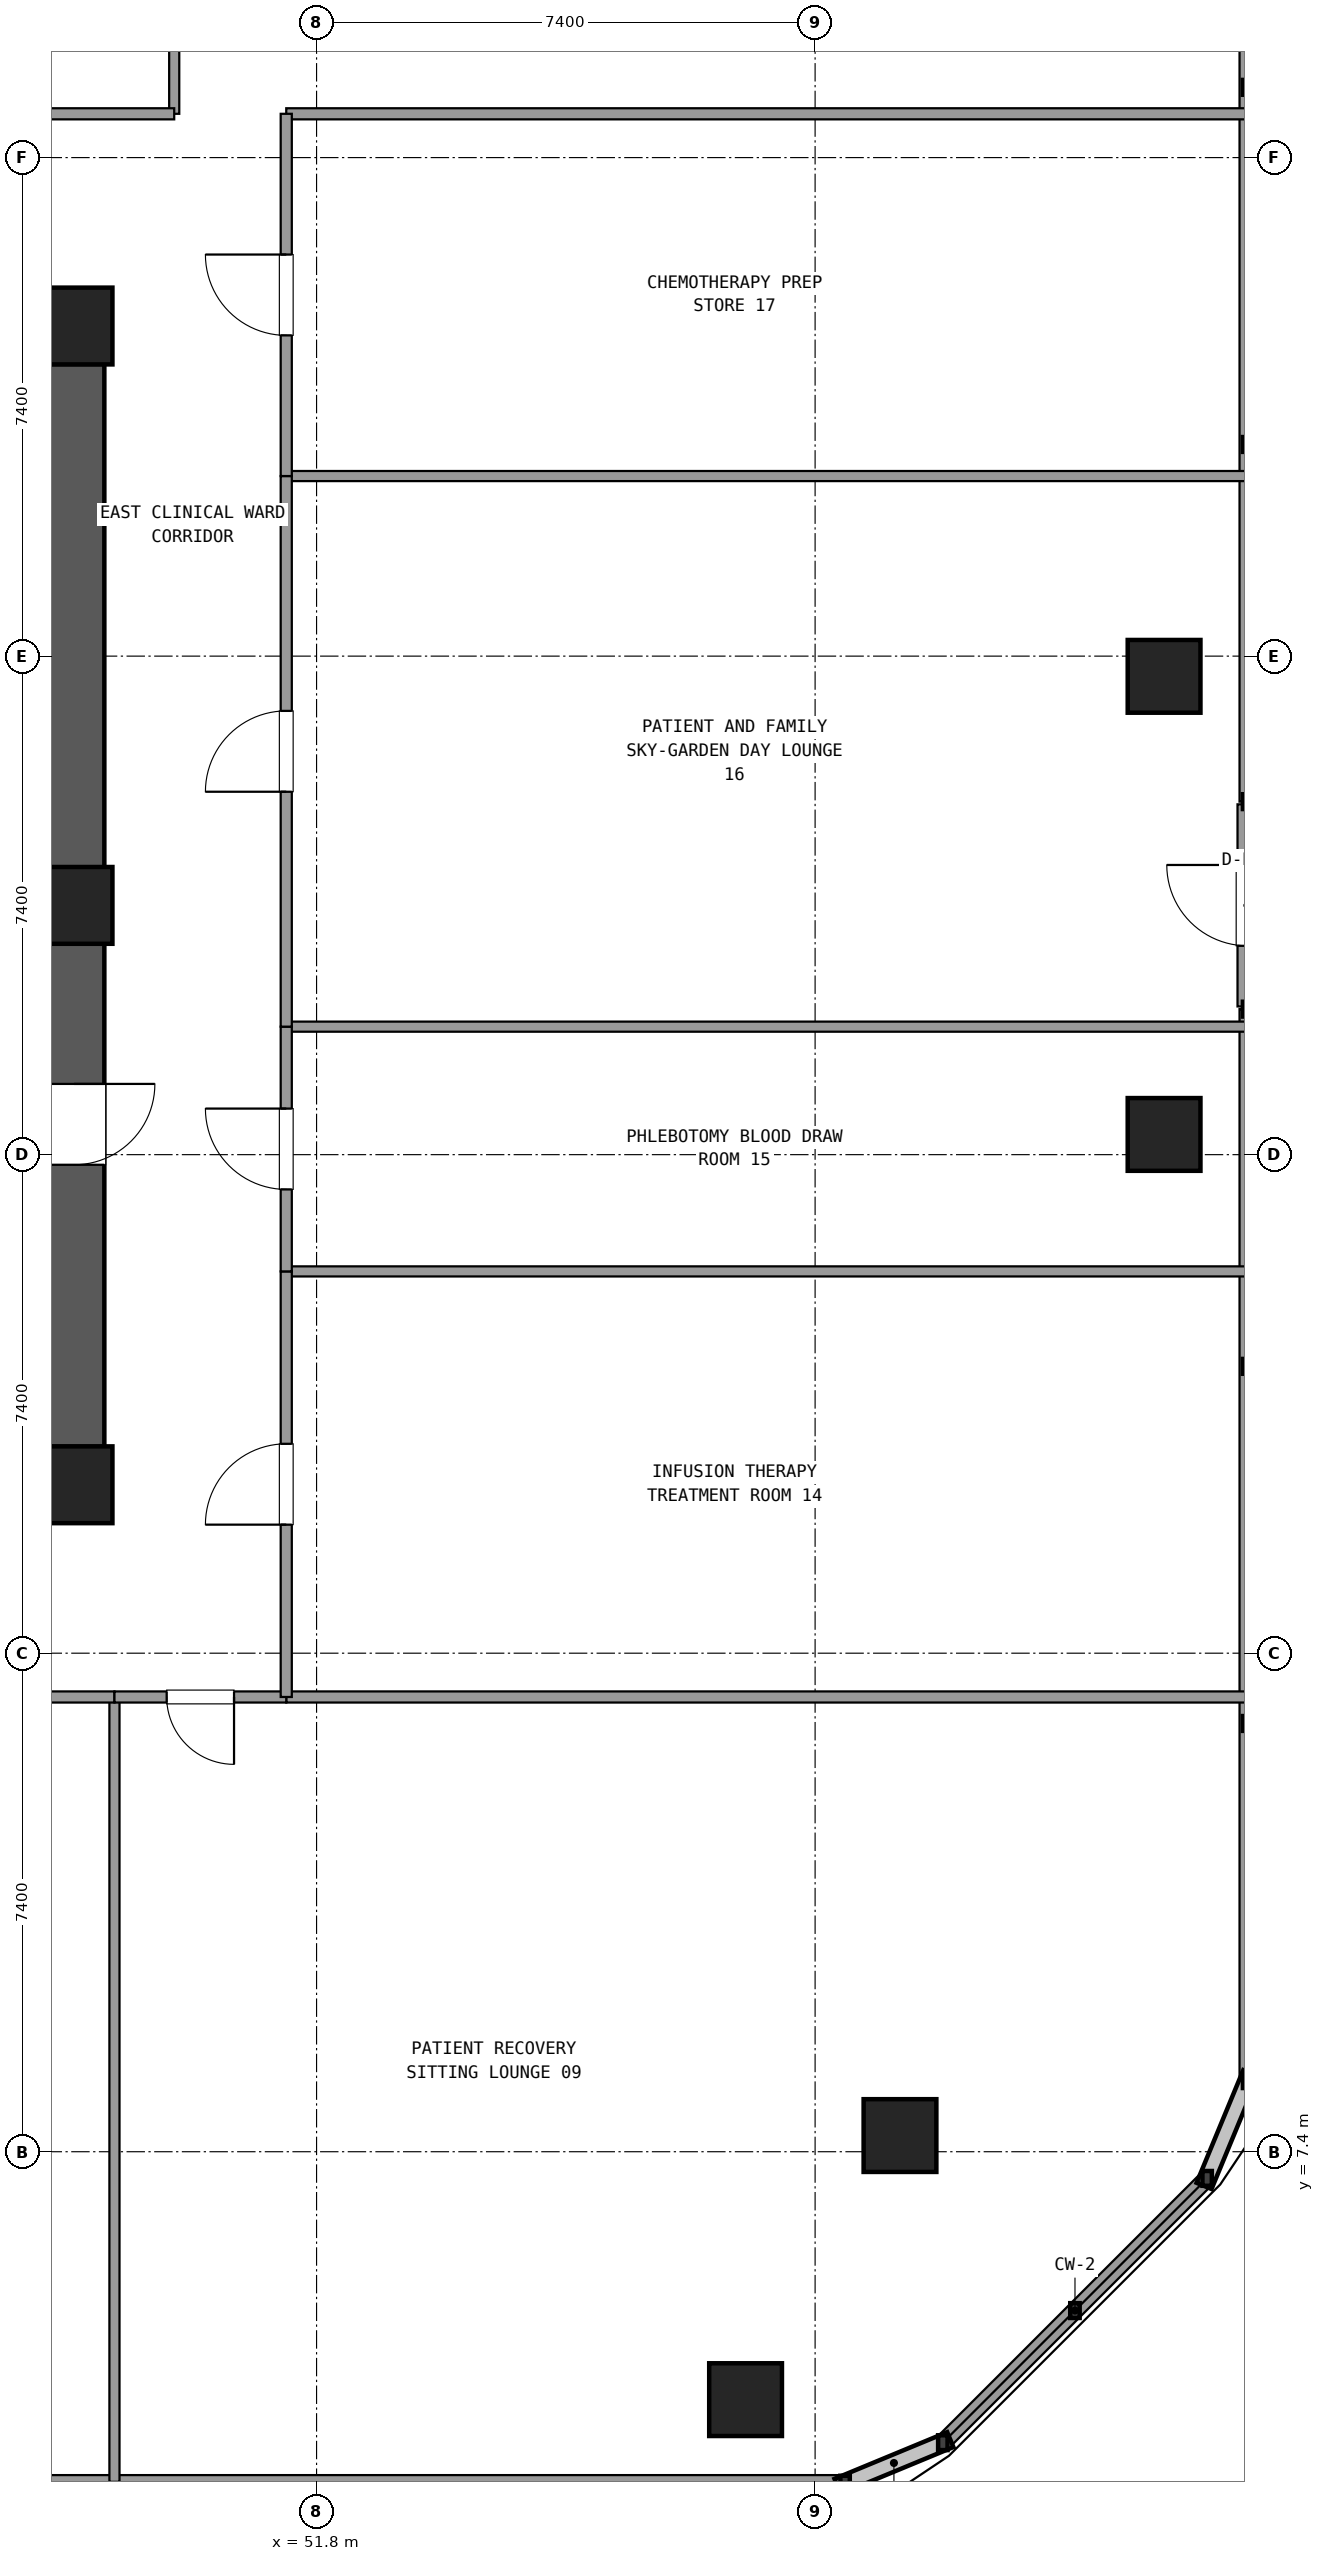
"""IFC4 building model, lengths in metres.
Left out: names, types, materials, properties, quantities, classifications, styles, units other than length and angle.
Written with IfcOpenShell. Run it as: python <this file> out.ifc"""

import sys

from ifc_helpers import new_model, si_unit, direction, frame, frame_2d, origin, origin_2d, place, context, subcontext, project, spatial, rectangle, extrude, element, fill, save


model = new_model("IFC4")
c1 = context("Model", 3, precision=1e-05, world=origin(), true_north=direction((0.0, 1.0)))
c2 = subcontext(c1, "Body", "Model", "MODEL_VIEW")
j1 = project(units=[si_unit("LENGTHUNIT", "METRE"), si_unit("PLANEANGLEUNIT", "RADIAN")], contexts=[c1])
p1 = place(None, origin())
s1 = spatial("IfcSite", under=j1, at=p1, CompositionType="ELEMENT")
p2 = place(p1, origin())
s2 = spatial("IfcBuilding", under=s1, at=p2, CompositionType="ELEMENT")
p3 = place(p2, frame((0.0, 0.0, 59.94)))
s3 = spatial("IfcBuildingStorey", under=s2, at=p3, CompositionType="ELEMENT", Elevation=59.94)
for number, where, z_axis, x_axis in (
    (1, (48.2, 17.3, 0.0), (0.0, 0.0, 1.0), (1.0, 0.0, 0.0)),
    (2, (48.2, 25.9, 0.0), (0.0, 0.0, 1.0), (1.0, 0.0, 0.0)),
    (3, (48.2, 34.5, 0.0), (0.0, 0.0, 1.0), (1.0, 0.0, 0.0)),
):
    element("IfcColumn", number, at=place(p3, frame(where, z_axis=z_axis, x_axis=x_axis)), inside=s3, PredefinedType="COLUMN", context=c2, shape_type="SweptSolid", body=[
        extrude(rectangle(XDim=1.14, YDim=1.14, at=origin_2d()), origin(), (0.0, 0.0, 1.0), 3.6),
    ])
p4 = place(p3, frame((48.2, 17.865, 0.0), z_axis=(0.0, 0.0, 1.0), x_axis=(0.0, 1.0, 0.0)))
e4 = element("IfcWall", 4, at=p4, inside=s3, PredefinedType="SHEAR", context=c2, shape_type="SweptSolid", body=[
    extrude(rectangle(XDim=7.47, YDim=0.9, at=frame_2d((3.735, 0.0))), origin(), (0.0, 0.0, 1.0), 3.32),
])
p5 = place(p4, frame((4.185, 0.0, 0.0)))
e5 = element("IfcOpeningElement", 5, at=p5, cuts=e4, PredefinedType="OPENING", context=c2, shape_type="SweptSolid", body=[
    extrude(rectangle(XDim=1.2, YDim=2.15, at=frame_2d((0.6, 1.075))), frame((0.0, 0.46, 0.0), z_axis=(0.0, -1.0, 0.0), x_axis=(1.0, 0.0, 0.0)), (0.0, 0.0, 1.0), 0.92),
])
p6 = place(p3, frame((48.2, 26.465, 0.0), z_axis=(0.0, 0.0, 1.0), x_axis=(0.0, 1.0, 0.0)))
e6 = element("IfcWall", 6, at=p6, inside=s3, PredefinedType="SHEAR", context=c2, shape_type="SweptSolid", body=[
    extrude(rectangle(XDim=7.47, YDim=0.9, at=frame_2d((3.735, 0.0))), origin(), (0.0, 0.0, 1.0), 3.32),
])
for number, where, z_axis, x_axis in (
    (7, (58.168, 3.72, 0.0), (0.0, 0.0, 1.0), (1.0, 0.0, 0.0)),
    (8, (60.46, 7.64, 0.0), (0.0, 0.0, 1.0), (1.0, 0.0, 0.0)),
    (9, (64.38, 22.5, 0.0), (0.0, 0.0, 1.0), (1.0, 0.0, 0.0)),
    (10, (64.38, 29.3, 0.0), (0.0, 0.0, 1.0), (1.0, 0.0, 0.0)),
):
    element("IfcColumn", number, at=place(p3, frame(where, z_axis=z_axis, x_axis=x_axis)), inside=s3, PredefinedType="COLUMN", context=c2, shape_type="SweptSolid", body=[
        extrude(rectangle(XDim=1.08, YDim=1.08, at=origin_2d()), origin(), (0.0, 0.0, 1.0), 3.6),
    ])
p7 = place(p3, frame((14.355, 2.48, 0.0), z_axis=(0.0, 0.0, 1.0), x_axis=(1.0, 0.0, 0.0)))
e11 = element("IfcWall", 11, at=p7, inside=s3, PredefinedType="SOLIDWALL", context=c2, shape_type="SweptSolid", body=[
    extrude(rectangle(XDim=45.29, YDim=0.24, at=frame_2d((22.645, 0.0))), origin(), (0.0, 0.0, 1.0), 0.85),
])
p8 = place(p3, frame((61.096, 3.081, 0.0), z_axis=(0.0, 0.0, 1.0), x_axis=(0.707128783731, 0.707084777957, 0.0)))
e12 = element("IfcWall", 12, at=p8, inside=s3, PredefinedType="SOLIDWALL", context=c2, shape_type="SweptSolid", body=[
    extrude(rectangle(XDim=5.548, YDim=0.24, at=frame_2d((2.774, 0.0))), origin(), (0.0, 0.0, 1.0), 0.85),
])
p9 = place(p3, frame((65.62, 24.4, 0.0), z_axis=(0.0, 0.0, 1.0), x_axis=(0.0, 1.0, 0.0)))
e13 = element("IfcWall", 13, at=p9, inside=s3, PredefinedType="SOLIDWALL", context=c2, shape_type="SweptSolid", body=[
    extrude(rectangle(XDim=3.0, YDim=0.3, at=frame_2d((1.5, 0.0))), origin(), (0.0, 0.0, 1.0), 2.65),
])
p10 = place(p9, frame((0.9, 0.0, 0.0)))
e14 = element("IfcOpeningElement", 14, at=p10, cuts=e13, PredefinedType="OPENING", context=c2, shape_type="SweptSolid", body=[
    extrude(rectangle(XDim=1.2, YDim=2.2, at=frame_2d((0.6, 1.1))), frame((0.0, 0.16, 0.0), z_axis=(0.0, -1.0, 0.0), x_axis=(1.0, 0.0, 0.0)), (0.0, 0.0, 1.0), 0.32),
])
for number, where, z_axis, x_axis in (
    (15, (65.62, 8.455, 0.0), (0.0, 0.0, 1.0), (0.0, 1.0, 0.0)),
    (16, (65.62, 27.44, 0.0), (0.0, 0.0, 1.0), (0.0, 1.0, 0.0)),
):
    element("IfcWall", number, at=place(p3, frame(where, z_axis=z_axis, x_axis=x_axis)), inside=s3, PredefinedType="SOLIDWALL", context=c2, shape_type="SweptSolid", body=[
        extrude(rectangle(XDim=15.905, YDim=0.24, at=frame_2d((7.953, 0.0))), origin(), (0.0, 0.0, 1.0), 0.85),
    ])
for number, where, z_axis, x_axis in (
    (17, (51.35, 37.65, 0.0), (0.0, 0.0, 1.0), (1.0, 0.0, 0.0)),
    (18, (51.35, 14.15, 0.0), (0.0, 0.0, 1.0), (1.0, 0.0, 0.0)),
):
    element("IfcWall", number, at=place(p3, frame(where, z_axis=z_axis, x_axis=x_axis)), inside=s3, PredefinedType="PARTITIONING", context=c2, shape_type="SweptSolid", body=[
        extrude(rectangle(XDim=14.25, YDim=0.165, at=frame_2d((7.125, 0.0))), origin(), (0.0, 0.0, 1.0), 2.61),
    ])
p11 = place(p3, frame((49.687, 37.65, 0.0), z_axis=(0.0, 0.0, 1.0), x_axis=(0.0, 1.0, 0.0)))
e19 = element("IfcWall", 19, at=p11, inside=s3, PredefinedType="PARTITIONING", context=c2, shape_type="SweptSolid", body=[
    extrude(rectangle(XDim=11.65, YDim=0.15, at=frame_2d((5.825, 0.0))), origin(), (0.0, 0.0, 1.0), 2.61),
])
p12 = place(p3, frame((40.31, 37.65, 0.0), z_axis=(0.0, 0.0, 1.0), x_axis=(1.0, 0.0, 0.0)))
e20 = element("IfcWall", 20, at=p12, inside=s3, PredefinedType="PARTITIONING", context=c2, shape_type="SweptSolid", body=[
    extrude(rectangle(XDim=9.377, YDim=0.165, at=frame_2d((4.688, 0.0))), origin(), (0.0, 0.0, 1.0), 2.61),
])
p13 = place(p12, frame((4.088, 0.0, 0.0)))
e21 = element("IfcOpeningElement", 21, at=p13, cuts=e20, PredefinedType="OPENING", context=c2, shape_type="SweptSolid", body=[
    extrude(rectangle(XDim=1.2, YDim=2.15, at=frame_2d((0.6, 1.075))), frame((0.0, 0.093, 0.0), z_axis=(0.0, -1.0, 0.0), x_axis=(1.0, 0.0, 0.0)), (0.0, 0.0, 1.0), 0.185),
])
p14 = place(p3, frame((48.8, 14.15, 0.0), z_axis=(0.0, 0.0, 1.0), x_axis=(0.0, -1.0, 0.0)))
e22 = element("IfcWall", 22, at=p14, inside=s3, PredefinedType="PARTITIONING", context=c2, shape_type="SweptSolid", body=[
    extrude(rectangle(XDim=11.65, YDim=0.15, at=frame_2d((5.825, 0.0))), origin(), (0.0, 0.0, 1.0), 2.61),
])
p15 = place(p3, frame((40.861, 14.15, 0.0), z_axis=(0.0, 0.0, 1.0), x_axis=(1.0, 0.0, 0.0)))
e23 = element("IfcWall", 23, at=p15, inside=s3, PredefinedType="PARTITIONING", context=c2, shape_type="SweptSolid", body=[
    extrude(rectangle(XDim=7.939, YDim=0.165, at=frame_2d((3.969, 0.0))), origin(), (0.0, 0.0, 1.0), 2.61),
])
p16 = place(p15, frame((3.369, 0.0, 0.0)))
e24 = element("IfcOpeningElement", 24, at=p16, cuts=e23, PredefinedType="OPENING", context=c2, shape_type="SweptSolid", body=[
    extrude(rectangle(XDim=1.2, YDim=2.15, at=frame_2d((0.6, 1.075))), frame((0.0, 0.093, 0.0), z_axis=(0.0, -1.0, 0.0), x_axis=(1.0, 0.0, 0.0)), (0.0, 0.0, 1.0), 0.185),
])
p17 = place(p3, frame((48.8, 14.15, 0.0), z_axis=(0.0, 0.0, 1.0), x_axis=(1.0, 0.0, 0.0)))
e25 = element("IfcWall", 25, at=p17, inside=s3, PredefinedType="PARTITIONING", context=c2, shape_type="SweptSolid", body=[
    extrude(rectangle(XDim=2.55, YDim=0.165, at=frame_2d((1.275, 0.0))), origin(), (0.0, 0.0, 1.0), 2.61),
])
p18 = place(p17, frame((0.775, 0.0, 0.0)))
e26 = element("IfcOpeningElement", 26, at=p18, cuts=e25, PredefinedType="OPENING", context=c2, shape_type="SweptSolid", body=[
    extrude(rectangle(XDim=1.0, YDim=2.15, at=frame_2d((0.5, 1.075))), frame((0.0, 0.093, 0.0), z_axis=(0.0, -1.0, 0.0), x_axis=(1.0, 0.0, 0.0)), (0.0, 0.0, 1.0), 0.185),
])
p19 = place(p3, frame((51.35, 20.467, 0.0), z_axis=(0.0, 0.0, 1.0), x_axis=(1.0, 0.0, 0.0)))
e27 = element("IfcWall", 27, at=p19, inside=s3, PredefinedType="PARTITIONING", context=c2, shape_type="SweptSolid", body=[
    extrude(rectangle(XDim=14.25, YDim=0.15, at=frame_2d((7.125, 0.0))), origin(), (0.0, 0.0, 1.0), 2.61),
])
p20 = place(p3, frame((51.35, 14.15, 0.0), z_axis=(0.0, 0.0, 1.0), x_axis=(0.0, 1.0, 0.0)))
e28 = element("IfcWall", 28, at=p20, inside=s3, PredefinedType="PARTITIONING", context=c2, shape_type="SweptSolid", body=[
    extrude(rectangle(XDim=6.317, YDim=0.165, at=frame_2d((3.159, 0.0))), origin(), (0.0, 0.0, 1.0), 2.61),
])
p21 = place(p20, frame((2.558, 0.0, 0.0)))
e29 = element("IfcOpeningElement", 29, at=p21, cuts=e28, PredefinedType="OPENING", context=c2, shape_type="SweptSolid", body=[
    extrude(rectangle(XDim=1.2, YDim=2.15, at=frame_2d((0.6, 1.075))), frame((0.0, 0.093, 0.0), z_axis=(0.0, -1.0, 0.0), x_axis=(1.0, 0.0, 0.0)), (0.0, 0.0, 1.0), 0.185),
])
p22 = place(p3, frame((51.35, 24.1, 0.0), z_axis=(0.0, 0.0, 1.0), x_axis=(1.0, 0.0, 0.0)))
e30 = element("IfcWall", 30, at=p22, inside=s3, PredefinedType="PARTITIONING", context=c2, shape_type="SweptSolid", body=[
    extrude(rectangle(XDim=14.25, YDim=0.15, at=frame_2d((7.125, 0.0))), origin(), (0.0, 0.0, 1.0), 2.61),
])
p23 = place(p3, frame((51.35, 20.467, 0.0), z_axis=(0.0, 0.0, 1.0), x_axis=(0.0, 1.0, 0.0)))
e31 = element("IfcWall", 31, at=p23, inside=s3, PredefinedType="PARTITIONING", context=c2, shape_type="SweptSolid", body=[
    extrude(rectangle(XDim=3.633, YDim=0.165, at=frame_2d((1.816, 0.0))), origin(), (0.0, 0.0, 1.0), 2.61),
])
p24 = place(p23, frame((1.217, 0.0, 0.0)))
e32 = element("IfcOpeningElement", 32, at=p24, cuts=e31, PredefinedType="OPENING", context=c2, shape_type="SweptSolid", body=[
    extrude(rectangle(XDim=1.2, YDim=2.15, at=frame_2d((0.6, 1.075))), frame((0.0, 0.093, 0.0), z_axis=(0.0, -1.0, 0.0), x_axis=(1.0, 0.0, 0.0)), (0.0, 0.0, 1.0), 0.185),
])
p25 = place(p3, frame((51.35, 32.273, 0.0), z_axis=(0.0, 0.0, 1.0), x_axis=(1.0, 0.0, 0.0)))
e33 = element("IfcWall", 33, at=p25, inside=s3, PredefinedType="PARTITIONING", context=c2, shape_type="SweptSolid", body=[
    extrude(rectangle(XDim=14.25, YDim=0.15, at=frame_2d((7.125, 0.0))), origin(), (0.0, 0.0, 1.0), 2.61),
])
p26 = place(p3, frame((51.35, 24.1, 0.0), z_axis=(0.0, 0.0, 1.0), x_axis=(0.0, 1.0, 0.0)))
e34 = element("IfcWall", 34, at=p26, inside=s3, PredefinedType="PARTITIONING", context=c2, shape_type="SweptSolid", body=[
    extrude(rectangle(XDim=8.173, YDim=0.165, at=frame_2d((4.086, 0.0))), origin(), (0.0, 0.0, 1.0), 2.61),
])
p27 = place(p26, frame((3.487, 0.0, 0.0)))
e35 = element("IfcOpeningElement", 35, at=p27, cuts=e34, PredefinedType="OPENING", context=c2, shape_type="SweptSolid", body=[
    extrude(rectangle(XDim=1.2, YDim=2.15, at=frame_2d((0.6, 1.075))), frame((0.0, 0.093, 0.0), z_axis=(0.0, -1.0, 0.0), x_axis=(1.0, 0.0, 0.0)), (0.0, 0.0, 1.0), 0.185),
])
p28 = place(p3, frame((51.35, 32.273, 0.0), z_axis=(0.0, 0.0, 1.0), x_axis=(0.0, 1.0, 0.0)))
e36 = element("IfcWall", 36, at=p28, inside=s3, PredefinedType="PARTITIONING", context=c2, shape_type="SweptSolid", body=[
    extrude(rectangle(XDim=5.377, YDim=0.165, at=frame_2d((2.688, 0.0))), origin(), (0.0, 0.0, 1.0), 2.61),
])
p29 = place(p28, frame((2.088, 0.0, 0.0)))
e37 = element("IfcOpeningElement", 37, at=p29, cuts=e36, PredefinedType="OPENING", context=c2, shape_type="SweptSolid", body=[
    extrude(rectangle(XDim=1.2, YDim=2.15, at=frame_2d((0.6, 1.075))), frame((0.0, 0.093, 0.0), z_axis=(0.0, -1.0, 0.0), x_axis=(1.0, 0.0, 0.0)), (0.0, 0.0, 1.0), 0.185),
])
p30 = place(p5, frame((1.2, 0.0, 0.0), z_axis=(0.0, 0.0, 1.0), x_axis=(-1.0, 0.0, 0.0)))
e38 = element("IfcDoor", 38, at=p30, inside=s3, OperationType="SINGLE_SWING_RIGHT", PredefinedType="DOOR", context=c2, shape_type="SweptSolid", body=[
    extrude(rectangle(XDim=1.2, YDim=2.15, at=frame_2d((0.6, 1.075))), frame((0.0, 0.025, 0.0), z_axis=(0.0, -1.0, 0.0), x_axis=(1.0, 0.0, 0.0)), (0.0, 0.0, 1.0), 0.05),
])
fill(e5, e38)
p31 = place(p18, frame((1.0, 0.0, 0.0), z_axis=(0.0, 0.0, 1.0), x_axis=(-1.0, 0.0, 0.0)))
e39 = element("IfcDoor", 39, at=p31, inside=s3, OperationType="SINGLE_SWING_RIGHT", PredefinedType="DOOR", context=c2, shape_type="SweptSolid", body=[
    extrude(rectangle(XDim=1.0, YDim=2.15, at=frame_2d((0.5, 1.075))), frame((0.0, 0.025, 0.0), z_axis=(0.0, -1.0, 0.0), x_axis=(1.0, 0.0, 0.0)), (0.0, 0.0, 1.0), 0.05),
])
fill(e26, e39)
p32 = place(p21, origin())
e40 = element("IfcDoor", 40, at=p32, inside=s3, OperationType="SINGLE_SWING_LEFT", PredefinedType="DOOR", context=c2, shape_type="SweptSolid", body=[
    extrude(rectangle(XDim=1.2, YDim=2.15, at=frame_2d((0.6, 1.075))), frame((0.0, 0.025, 0.0), z_axis=(0.0, -1.0, 0.0), x_axis=(1.0, 0.0, 0.0)), (0.0, 0.0, 1.0), 0.05),
])
fill(e29, e40)
p33 = place(p24, origin())
e41 = element("IfcDoor", 41, at=p33, inside=s3, OperationType="SINGLE_SWING_RIGHT", PredefinedType="DOOR", context=c2, shape_type="SweptSolid", body=[
    extrude(rectangle(XDim=1.2, YDim=2.15, at=frame_2d((0.6, 1.075))), frame((0.0, 0.025, 0.0), z_axis=(0.0, -1.0, 0.0), x_axis=(1.0, 0.0, 0.0)), (0.0, 0.0, 1.0), 0.05),
])
fill(e32, e41)
p34 = place(p27, origin())
e42 = element("IfcDoor", 42, at=p34, inside=s3, OperationType="SINGLE_SWING_LEFT", PredefinedType="DOOR", context=c2, shape_type="SweptSolid", body=[
    extrude(rectangle(XDim=1.2, YDim=2.15, at=frame_2d((0.6, 1.075))), frame((0.0, 0.025, 0.0), z_axis=(0.0, -1.0, 0.0), x_axis=(1.0, 0.0, 0.0)), (0.0, 0.0, 1.0), 0.05),
])
fill(e35, e42)
p35 = place(p29, origin())
e43 = element("IfcDoor", 43, at=p35, inside=s3, OperationType="SINGLE_SWING_RIGHT", PredefinedType="DOOR", context=c2, shape_type="SweptSolid", body=[
    extrude(rectangle(XDim=1.2, YDim=2.15, at=frame_2d((0.6, 1.075))), frame((0.0, 0.025, 0.0), z_axis=(0.0, -1.0, 0.0), x_axis=(1.0, 0.0, 0.0)), (0.0, 0.0, 1.0), 0.05),
])
fill(e37, e43)
save(model, sys.argv[1])
